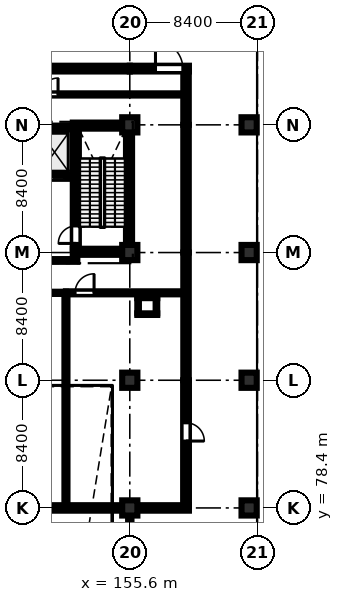
"""IFC4 building model, lengths in metres.
Left out: names, types, materials, properties, quantities, classifications, styles, units other than length and angle.
Written with IfcOpenShell. Run it as: python <this file> out.ifc"""

import sys

from ifc_helpers import new_model, si_unit, direction, frame, frame_2d, origin, origin_2d, place, context, subcontext, project, spatial, rectangle, extrude, element, fill, save


model = new_model("IFC4")
c1 = context("Model", 3, precision=1e-05, world=origin(), true_north=direction((0.0, 1.0)))
c2 = subcontext(c1, "Body", "Model", "MODEL_VIEW")
j1 = project(units=[si_unit("LENGTHUNIT", "METRE"), si_unit("PLANEANGLEUNIT", "RADIAN")], contexts=[c1])
p1 = place(None, origin())
s1 = spatial("IfcSite", under=j1, at=p1, CompositionType="ELEMENT")
p2 = place(p1, origin())
s2 = spatial("IfcBuilding", under=s1, at=p2, CompositionType="ELEMENT")
p3 = place(p2, origin())
s3 = spatial("IfcBuildingStorey", under=s2, at=p3, CompositionType="ELEMENT", Elevation=0.0)
for number, where, z_axis, x_axis in (
    (1, (155.6, 78.4, 0.0), (0.0, 0.0, 1.0), (1.0, 0.0, 0.0)),
    (2, (155.6, 86.8, 0.0), (0.0, 0.0, 1.0), (1.0, 0.0, 0.0)),
    (3, (155.6, 95.2, 0.0), (0.0, 0.0, 1.0), (1.0, 0.0, 0.0)),
    (4, (155.6, 103.6, 0.0), (0.0, 0.0, 1.0), (1.0, 0.0, 0.0)),
    (5, (163.45, 78.4, 0.0), (0.0, 0.0, 1.0), (1.0, 0.0, 0.0)),
    (6, (163.45, 86.8, 0.0), (0.0, 0.0, 1.0), (1.0, 0.0, 0.0)),
    (7, (163.45, 95.2, 0.0), (0.0, 0.0, 1.0), (1.0, 0.0, 0.0)),
    (8, (163.45, 103.6, 0.0), (0.0, 0.0, 1.0), (1.0, 0.0, 0.0)),
):
    element("IfcColumn", number, at=place(p3, frame(where, z_axis=z_axis, x_axis=x_axis)), inside=s3, PredefinedType="COLUMN", context=c2, shape_type="SweptSolid", body=[
        extrude(rectangle(XDim=1.0, YDim=1.0, at=origin_2d()), origin(), (0.0, 0.0, 1.0), 5.18),
    ])
for number, where, z_axis, x_axis in (
    (9, (151.85, 95.25, 0.0), (0.0, 0.0, 1.0), (1.0, 0.0, 0.0)),
    (10, (151.85, 103.55, 0.0), (0.0, 0.0, 1.0), (1.0, 0.0, 0.0)),
):
    element("IfcWall", number, at=place(p3, frame(where, z_axis=z_axis, x_axis=x_axis)), inside=s3, PredefinedType="SHEAR", context=c2, shape_type="SweptSolid", body=[
        extrude(rectangle(XDim=3.9, YDim=0.4, at=frame_2d((1.95, 0.0))), origin(), (0.0, 0.0, 1.0), 5.18),
    ])
p4 = place(p3, frame((152.05, 95.45, 0.0), z_axis=(0.0, 0.0, 1.0), x_axis=(0.0, 1.0, 0.0)))
e11 = element("IfcWall", 11, at=p4, inside=s3, PredefinedType="SHEAR", context=c2, shape_type="SweptSolid", body=[
    extrude(rectangle(XDim=7.9, YDim=0.4, at=frame_2d((3.95, 0.0))), origin(), (0.0, 0.0, 1.0), 5.18),
])
p5 = place(p4, frame((0.35, 0.0, 0.0)))
e12 = element("IfcOpeningElement", 12, at=p5, cuts=e11, PredefinedType="OPENING", context=c2, shape_type="SweptSolid", body=[
    extrude(rectangle(XDim=1.15, YDim=2.15, at=frame_2d((0.575, 1.075))), frame((0.0, 0.21, 0.0), z_axis=(0.0, -1.0, 0.0), x_axis=(1.0, 0.0, 0.0)), (0.0, 0.0, 1.0), 0.42),
])
p6 = place(p3, frame((155.55, 95.45, 0.0), z_axis=(0.0, 0.0, 1.0), x_axis=(0.0, 1.0, 0.0)))
e13 = element("IfcWall", 13, at=p6, inside=s3, PredefinedType="SHEAR", context=c2, shape_type="SweptSolid", body=[
    extrude(rectangle(XDim=7.9, YDim=0.4, at=frame_2d((3.95, 0.0))), origin(), (0.0, 0.0, 1.0), 5.18),
])
p7 = place(p3, frame((149.45, 100.175, 0.0), z_axis=(0.0, 0.0, 1.0), x_axis=(1.0, 0.0, 0.0)))
e14 = element("IfcWall", 14, at=p7, inside=s3, PredefinedType="SHEAR", context=c2, shape_type="SweptSolid", body=[
    extrude(rectangle(XDim=2.4, YDim=0.25, at=frame_2d((1.2, 0.0))), origin(), (0.0, 0.0, 1.0), 5.18),
])
p8 = place(p7, frame((0.55, 0.0, 0.0)))
e15 = element("IfcOpeningElement", 15, at=p8, cuts=e14, PredefinedType="OPENING", context=c2, shape_type="SweptSolid", body=[
    extrude(rectangle(XDim=1.3, YDim=2.25, at=frame_2d((0.65, 1.125))), frame((0.0, 0.135, 0.0), z_axis=(0.0, -1.0, 0.0), x_axis=(1.0, 0.0, 0.0)), (0.0, 0.0, 1.0), 0.27),
])
p9 = place(p3, frame((149.45, 103.425, 0.0), z_axis=(0.0, 0.0, 1.0), x_axis=(1.0, 0.0, 0.0)))
e16 = element("IfcWall", 16, at=p9, inside=s3, PredefinedType="SHEAR", context=c2, shape_type="SweptSolid", body=[
    extrude(rectangle(XDim=2.4, YDim=0.25, at=frame_2d((1.2, 0.0))), origin(), (0.0, 0.0, 1.0), 5.18),
])
p10 = place(p3, frame((155.6, 78.22, 0.0), z_axis=(0.0, 0.0, 1.0), x_axis=(0.0, -1.0, 0.0)))
e17 = element("IfcWall", 17, at=p10, inside=s3, PredefinedType="SHEAR", context=c2, shape_type="SweptSolid", body=[
    extrude(rectangle(XDim=28.51, YDim=0.22, at=frame_2d((14.255, 0.0))), origin(), (0.0, 0.0, 1.0), 5.25),
])
p11 = place(p3, frame((147.2, 107.3, 0.0), z_axis=(0.0, 0.0, 1.0), x_axis=(1.0, 0.0, 0.0)))
e18 = element("IfcWall", 18, at=p11, inside=s3, PredefinedType="SOLIDWALL", context=c2, shape_type="SweptSolid", body=[
    extrude(rectangle(XDim=8.4, YDim=0.38, at=frame_2d((4.2, 0.0))), origin(), (0.0, 0.0, 1.0), 5.18),
])
p12 = place(p11, frame((2.4, 0.0, 0.85)))
e19 = element("IfcOpeningElement", 19, at=p12, cuts=e18, PredefinedType="OPENING", context=c2, shape_type="SweptSolid", body=[
    extrude(rectangle(XDim=2.6, YDim=2.4, at=frame_2d((1.3, 1.2))), frame((0.0, 0.2, 0.0), z_axis=(0.0, -1.0, 0.0), x_axis=(1.0, 0.0, 0.0)), (0.0, 0.0, 1.0), 0.4),
])
p13 = place(p3, frame((155.6, 107.3, 0.0), z_axis=(0.0, 0.0, 1.0), x_axis=(1.0, 0.0, 0.0)))
e20 = element("IfcWall", 20, at=p13, inside=s3, PredefinedType="SOLIDWALL", context=c2, shape_type="SweptSolid", body=[
    extrude(rectangle(XDim=3.89, YDim=0.38, at=frame_2d((1.945, 0.0))), origin(), (0.0, 0.0, 1.0), 5.18),
])
p14 = place(p13, frame((1.69, 0.0, 0.0)))
e21 = element("IfcOpeningElement", 21, at=p14, cuts=e20, PredefinedType="OPENING", context=c2, shape_type="SweptSolid", body=[
    extrude(rectangle(XDim=1.8, YDim=2.3, at=frame_2d((0.9, 1.15))), frame((0.0, 0.2, 0.0), z_axis=(0.0, -1.0, 0.0), x_axis=(1.0, 0.0, 0.0)), (0.0, 0.0, 1.0), 0.4),
])
p15 = place(p3, frame((155.1, 78.4, 0.0), z_axis=(0.0, 0.0, 1.0), x_axis=(-1.0, 0.0, 0.0)))
e22 = element("IfcWall", 22, at=p15, inside=s3, PredefinedType="STANDARD", context=c2, shape_type="SweptSolid", body=[
    extrude(rectangle(XDim=7.4, YDim=0.36, at=frame_2d((3.7, 0.0))), origin(), (0.0, 0.0, 1.0), 3.98),
])
p16 = place(p15, frame((1.15, 0.0, 0.95)))
e23 = element("IfcOpeningElement", 23, at=p16, cuts=e22, PredefinedType="OPENING", context=c2, shape_type="SweptSolid", body=[
    extrude(rectangle(XDim=2.1, YDim=2.1, at=frame_2d((1.05, 1.05))), frame((0.0, 0.19, 0.0), z_axis=(0.0, -1.0, 0.0), x_axis=(1.0, 0.0, 0.0)), (0.0, 0.0, 1.0), 0.38),
])
p17 = place(p3, frame((159.49, 78.4, 0.0), z_axis=(0.0, 0.0, 1.0), x_axis=(-1.0, 0.0, 0.0)))
e24 = element("IfcWall", 24, at=p17, inside=s3, PredefinedType="STANDARD", context=c2, shape_type="SweptSolid", body=[
    extrude(rectangle(XDim=3.39, YDim=0.36, at=frame_2d((1.695, 0.0))), origin(), (0.0, 0.0, 1.0), 3.98),
])
p18 = place(p3, frame((159.3, 86.8, 0.0), z_axis=(0.0, 0.0, 1.0), x_axis=(0.0, -1.0, 0.0)))
e25 = element("IfcWall", 25, at=p18, inside=s3, PredefinedType="SOLIDWALL", context=c2, shape_type="SweptSolid", body=[
    extrude(rectangle(XDim=8.22, YDim=0.38, at=frame_2d((4.11, 0.0))), origin(), (0.0, 0.0, 1.0), 4.78),
])
p19 = place(p18, frame((2.8, 0.0, 0.0)))
e26 = element("IfcOpeningElement", 26, at=p19, cuts=e25, PredefinedType="OPENING", context=c2, shape_type="SweptSolid", body=[
    extrude(rectangle(XDim=1.2, YDim=2.2, at=frame_2d((0.6, 1.1))), frame((0.0, 0.2, 0.0), z_axis=(0.0, -1.0, 0.0), x_axis=(1.0, 0.0, 0.0)), (0.0, 0.0, 1.0), 0.4),
])
p20 = place(p3, frame((159.3, 95.2, 0.0), z_axis=(0.0, 0.0, 1.0), x_axis=(0.0, -1.0, 0.0)))
e27 = element("IfcWall", 27, at=p20, inside=s3, PredefinedType="STANDARD", context=c2, shape_type="SweptSolid", body=[
    extrude(rectangle(XDim=8.4, YDim=0.36, at=frame_2d((4.2, 0.0))), origin(), (0.0, 0.0, 1.0), 4.78),
])
p21 = place(p20, frame((3.6, 0.0, 1.1)))
e28 = element("IfcOpeningElement", 28, at=p21, cuts=e27, PredefinedType="OPENING", context=c2, shape_type="SweptSolid", body=[
    extrude(rectangle(XDim=1.8, YDim=1.8, at=frame_2d((0.9, 0.9))), frame((0.0, 0.19, 0.0), z_axis=(0.0, -1.0, 0.0), x_axis=(1.0, 0.0, 0.0)), (0.0, 0.0, 1.0), 0.38),
])
p22 = place(p3, frame((159.3, 103.6, 0.0), z_axis=(0.0, 0.0, 1.0), x_axis=(0.0, -1.0, 0.0)))
e29 = element("IfcWall", 29, at=p22, inside=s3, PredefinedType="STANDARD", context=c2, shape_type="SweptSolid", body=[
    extrude(rectangle(XDim=8.4, YDim=0.36, at=frame_2d((4.2, 0.0))), origin(), (0.0, 0.0, 1.0), 4.78),
])
p23 = place(p22, frame((1.15, 0.0, 1.1)))
e30 = element("IfcOpeningElement", 30, at=p23, cuts=e29, PredefinedType="OPENING", context=c2, shape_type="SweptSolid", body=[
    extrude(rectangle(XDim=1.4, YDim=1.4, at=frame_2d((0.7, 0.7))), frame((0.0, 0.19, 0.0), z_axis=(0.0, -1.0, 0.0), x_axis=(1.0, 0.0, 0.0)), (0.0, 0.0, 1.0), 0.38),
])
p24 = place(p3, frame((159.3, 107.11, 0.0), z_axis=(0.0, 0.0, 1.0), x_axis=(0.0, -1.0, 0.0)))
e31 = element("IfcWall", 31, at=p24, inside=s3, PredefinedType="STANDARD", context=c2, shape_type="SweptSolid", body=[
    extrude(rectangle(XDim=3.51, YDim=0.36, at=frame_2d((1.755, 0.0))), origin(), (0.0, 0.0, 1.0), 4.78),
])
p25 = place(p24, frame((1.95, 0.0, 1.1)))
e32 = element("IfcOpeningElement", 32, at=p25, cuts=e31, PredefinedType="OPENING", context=c2, shape_type="SweptSolid", body=[
    extrude(rectangle(XDim=1.2, YDim=1.8, at=frame_2d((0.6, 0.9))), frame((0.0, 0.19, 0.0), z_axis=(0.0, -1.0, 0.0), x_axis=(1.0, 0.0, 0.0)), (0.0, 0.0, 1.0), 0.38),
])
p26 = place(p3, frame((147.3, 94.68, 0.0), z_axis=(0.0, 0.0, 1.0), x_axis=(1.0, 0.0, 0.0)))
e33 = element("IfcWall", 33, at=p26, inside=s3, PredefinedType="STANDARD", context=c2, shape_type="SweptSolid", body=[
    extrude(rectangle(XDim=4.85, YDim=0.18, at=frame_2d((2.425, 0.0))), origin(), (0.0, 0.0, 1.0), 5.18),
])
p27 = place(p26, frame((1.6, 0.0, 0.0)))
e34 = element("IfcOpeningElement", 34, at=p27, cuts=e33, PredefinedType="OPENING", context=c2, shape_type="SweptSolid", body=[
    extrude(rectangle(XDim=1.15, YDim=2.15, at=frame_2d((0.575, 1.075))), frame((0.0, 0.1, 0.0), z_axis=(0.0, -1.0, 0.0), x_axis=(1.0, 0.0, 0.0)), (0.0, 0.0, 1.0), 0.2),
])
p28 = place(p3, frame((143.0, 105.6, 0.0), z_axis=(0.0, 0.0, 1.0), x_axis=(1.0, 0.0, 0.0)))
e35 = element("IfcWall", 35, at=p28, inside=s3, PredefinedType="PARTITIONING", context=c2, shape_type="SweptSolid", body=[
    extrude(rectangle(XDim=16.12, YDim=0.145, at=frame_2d((8.06, 0.0))), origin(), (0.0, 0.0, 1.0), 5.18),
])
p29 = place(p28, frame((6.8, 0.0, 0.0)))
e36 = element("IfcOpeningElement", 36, at=p29, cuts=e35, PredefinedType="OPENING", context=c2, shape_type="SweptSolid", body=[
    extrude(rectangle(XDim=1.08, YDim=2.15, at=frame_2d((0.54, 1.075))), frame((0.0, 0.083, 0.0), z_axis=(0.0, -1.0, 0.0), x_axis=(1.0, 0.0, 0.0)), (0.0, 0.0, 1.0), 0.165),
])
p30 = place(p3, frame((134.6, 92.55, 0.0), z_axis=(0.0, 0.0, 1.0), x_axis=(1.0, 0.0, 0.0)))
e37 = element("IfcWall", 37, at=p30, inside=s3, PredefinedType="PARTITIONING", context=c2, shape_type="SweptSolid", body=[
    extrude(rectangle(XDim=16.8, YDim=0.145, at=frame_2d((8.4, 0.0))), origin(), (0.0, 0.0, 1.0), 5.18),
])
p31 = place(p30, frame((6.8, 0.0, 0.0)))
e38 = element("IfcOpeningElement", 38, at=p31, cuts=e37, PredefinedType="OPENING", context=c2, shape_type="SweptSolid", body=[
    extrude(rectangle(XDim=1.85, YDim=2.25, at=frame_2d((0.925, 1.125))), frame((0.0, 0.083, 0.0), z_axis=(0.0, -1.0, 0.0), x_axis=(1.0, 0.0, 0.0)), (0.0, 0.0, 1.0), 0.165),
])
p32 = place(p3, frame((151.4, 92.55, 0.0), z_axis=(0.0, 0.0, 1.0), x_axis=(1.0, 0.0, 0.0)))
e39 = element("IfcWall", 39, at=p32, inside=s3, PredefinedType="SOLIDWALL", context=c2, shape_type="SweptSolid", body=[
    extrude(rectangle(XDim=7.72, YDim=0.2, at=frame_2d((3.86, 0.0))), origin(), (0.0, 0.0, 1.0), 5.18),
])
p33 = place(p32, frame((0.6, 0.0, 0.0)))
e40 = element("IfcOpeningElement", 40, at=p33, cuts=e39, PredefinedType="OPENING", context=c2, shape_type="SweptSolid", body=[
    extrude(rectangle(XDim=1.25, YDim=2.2, at=frame_2d((0.625, 1.1))), frame((0.0, 0.11, 0.0), z_axis=(0.0, -1.0, 0.0), x_axis=(1.0, 0.0, 0.0)), (0.0, 0.0, 1.0), 0.22),
])
p34 = place(p3, frame((151.4, 78.55, 0.0), z_axis=(0.0, 0.0, 1.0), x_axis=(0.0, 1.0, 0.0)))
e41 = element("IfcWall", 41, at=p34, inside=s3, PredefinedType="SOLIDWALL", context=c2, shape_type="SweptSolid", body=[
    extrude(rectangle(XDim=14.0, YDim=0.2, at=frame_2d((7.0, 0.0))), origin(), (0.0, 0.0, 1.0), 4.78),
])
for number, where, z_axis, x_axis in (
    (42, (156.095, 91.147, 0.0), (0.0, 0.0, 1.0), (1.0, 0.0, 0.0)),
    (43, (156.095, 92.252, 0.0), (0.0, 0.0, 1.0), (1.0, 0.0, 0.0)),
):
    element("IfcWall", number, at=place(p3, frame(where, z_axis=z_axis, x_axis=x_axis)), inside=s3, PredefinedType="PARTITIONING", context=c2, shape_type="SweptSolid", body=[
        extrude(rectangle(XDim=1.31, YDim=0.105, at=frame_2d((0.655, 0.0))), origin(), (0.0, 0.0, 1.0), 5.18),
    ])
for number, where, z_axis, x_axis in (
    (44, (156.147, 91.2, 0.0), (0.0, 0.0, 1.0), (0.0, 1.0, 0.0)),
    (45, (157.353, 91.2, 0.0), (0.0, 0.0, 1.0), (0.0, 1.0, 0.0)),
):
    element("IfcWall", number, at=place(p3, frame(where, z_axis=z_axis, x_axis=x_axis)), inside=s3, PredefinedType="PARTITIONING", context=c2, shape_type="SweptSolid", body=[
        extrude(rectangle(XDim=1.0, YDim=0.105, at=frame_2d((0.5, 0.0))), origin(), (0.0, 0.0, 1.0), 5.18),
    ])
p35 = place(p12, origin())
e46 = element("IfcWindow", 46, at=p35, inside=s3, PartitioningType="TRIPLE_PANEL_VERTICAL", PredefinedType="WINDOW", context=c2, shape_type="SweptSolid", body=[
    extrude(rectangle(XDim=2.6, YDim=2.4, at=frame_2d((1.3, 1.2))), frame((0.0, 0.03, 0.0), z_axis=(0.0, -1.0, 0.0), x_axis=(1.0, 0.0, 0.0)), (0.0, 0.0, 1.0), 0.06),
])
fill(e19, e46)
p36 = place(p14, origin())
e47 = element("IfcDoor", 47, at=p36, inside=s3, OperationType="SINGLE_SWING_LEFT", PredefinedType="DOOR", context=c2, shape_type="SweptSolid", body=[
    extrude(rectangle(XDim=1.8, YDim=2.3, at=frame_2d((0.9, 1.15))), frame((0.0, 0.025, 0.0), z_axis=(0.0, -1.0, 0.0), x_axis=(1.0, 0.0, 0.0)), (0.0, 0.0, 1.0), 0.05),
])
fill(e21, e47)
p37 = place(p16, origin())
e48 = element("IfcWindow", 48, at=p37, inside=s3, PartitioningType="DOUBLE_PANEL_VERTICAL", PredefinedType="WINDOW", context=c2, shape_type="SweptSolid", body=[
    extrude(rectangle(XDim=2.1, YDim=2.1, at=frame_2d((1.05, 1.05))), frame((0.0, 0.03, 0.0), z_axis=(0.0, -1.0, 0.0), x_axis=(1.0, 0.0, 0.0)), (0.0, 0.0, 1.0), 0.06),
])
fill(e23, e48)
p38 = place(p19, origin())
e49 = element("IfcDoor", 49, at=p38, inside=s3, OperationType="SINGLE_SWING_RIGHT", PredefinedType="DOOR", context=c2, shape_type="SweptSolid", body=[
    extrude(rectangle(XDim=1.2, YDim=2.2, at=frame_2d((0.6, 1.1))), frame((0.0, 0.025, 0.0), z_axis=(0.0, -1.0, 0.0), x_axis=(1.0, 0.0, 0.0)), (0.0, 0.0, 1.0), 0.05),
])
fill(e26, e49)
p39 = place(p21, origin())
e50 = element("IfcWindow", 50, at=p39, inside=s3, PartitioningType="DOUBLE_PANEL_VERTICAL", PredefinedType="WINDOW", context=c2, shape_type="SweptSolid", body=[
    extrude(rectangle(XDim=1.8, YDim=1.8, at=frame_2d((0.9, 0.9))), frame((0.0, 0.03, 0.0), z_axis=(0.0, -1.0, 0.0), x_axis=(1.0, 0.0, 0.0)), (0.0, 0.0, 1.0), 0.06),
])
fill(e28, e50)
p40 = place(p23, origin())
e51 = element("IfcWindow", 51, at=p40, inside=s3, PartitioningType="SINGLE_PANEL", PredefinedType="WINDOW", context=c2, shape_type="SweptSolid", body=[
    extrude(rectangle(XDim=1.4, YDim=1.4, at=frame_2d((0.7, 0.7))), frame((0.0, 0.03, 0.0), z_axis=(0.0, -1.0, 0.0), x_axis=(1.0, 0.0, 0.0)), (0.0, 0.0, 1.0), 0.06),
])
fill(e30, e51)
p41 = place(p25, origin())
e52 = element("IfcWindow", 52, at=p41, inside=s3, PartitioningType="SINGLE_PANEL", PredefinedType="WINDOW", context=c2, shape_type="SweptSolid", body=[
    extrude(rectangle(XDim=1.2, YDim=1.8, at=frame_2d((0.6, 0.9))), frame((0.0, 0.03, 0.0), z_axis=(0.0, -1.0, 0.0), x_axis=(1.0, 0.0, 0.0)), (0.0, 0.0, 1.0), 0.06),
])
fill(e32, e52)
p42 = place(p29, origin())
e53 = element("IfcDoor", 53, at=p42, inside=s3, OperationType="SINGLE_SWING_RIGHT", PredefinedType="DOOR", context=c2, shape_type="SweptSolid", body=[
    extrude(rectangle(XDim=1.08, YDim=2.15, at=frame_2d((0.54, 1.075))), frame((0.0, 0.025, 0.0), z_axis=(0.0, -1.0, 0.0), x_axis=(1.0, 0.0, 0.0)), (0.0, 0.0, 1.0), 0.05),
])
fill(e36, e53)
p43 = place(p33, origin())
e54 = element("IfcDoor", 54, at=p43, inside=s3, OperationType="SINGLE_SWING_RIGHT", PredefinedType="DOOR", context=c2, shape_type="SweptSolid", body=[
    extrude(rectangle(XDim=1.25, YDim=2.2, at=frame_2d((0.625, 1.1))), frame((0.0, 0.025, 0.0), z_axis=(0.0, -1.0, 0.0), x_axis=(1.0, 0.0, 0.0)), (0.0, 0.0, 1.0), 0.05),
])
fill(e40, e54)
p44 = place(p5, origin())
e55 = element("IfcDoor", 55, at=p44, inside=s3, OperationType="SINGLE_SWING_LEFT", PredefinedType="DOOR", context=c2, shape_type="SweptSolid", body=[
    extrude(rectangle(XDim=1.15, YDim=2.15, at=frame_2d((0.575, 1.075))), frame((0.0, 0.025, 0.0), z_axis=(0.0, -1.0, 0.0), x_axis=(1.0, 0.0, 0.0)), (0.0, 0.0, 1.0), 0.05),
])
fill(e12, e55)
p45 = place(p8, origin())
e56 = element("IfcDoor", 56, at=p45, inside=s3, OperationType="SLIDING_TO_LEFT", PredefinedType="DOOR", context=c2, shape_type="SweptSolid", body=[
    extrude(rectangle(XDim=1.3, YDim=2.25, at=frame_2d((0.65, 1.125))), frame((0.0, 0.025, 0.0), z_axis=(0.0, -1.0, 0.0), x_axis=(1.0, 0.0, 0.0)), (0.0, 0.0, 1.0), 0.05),
])
fill(e15, e56)
save(model, sys.argv[1])
